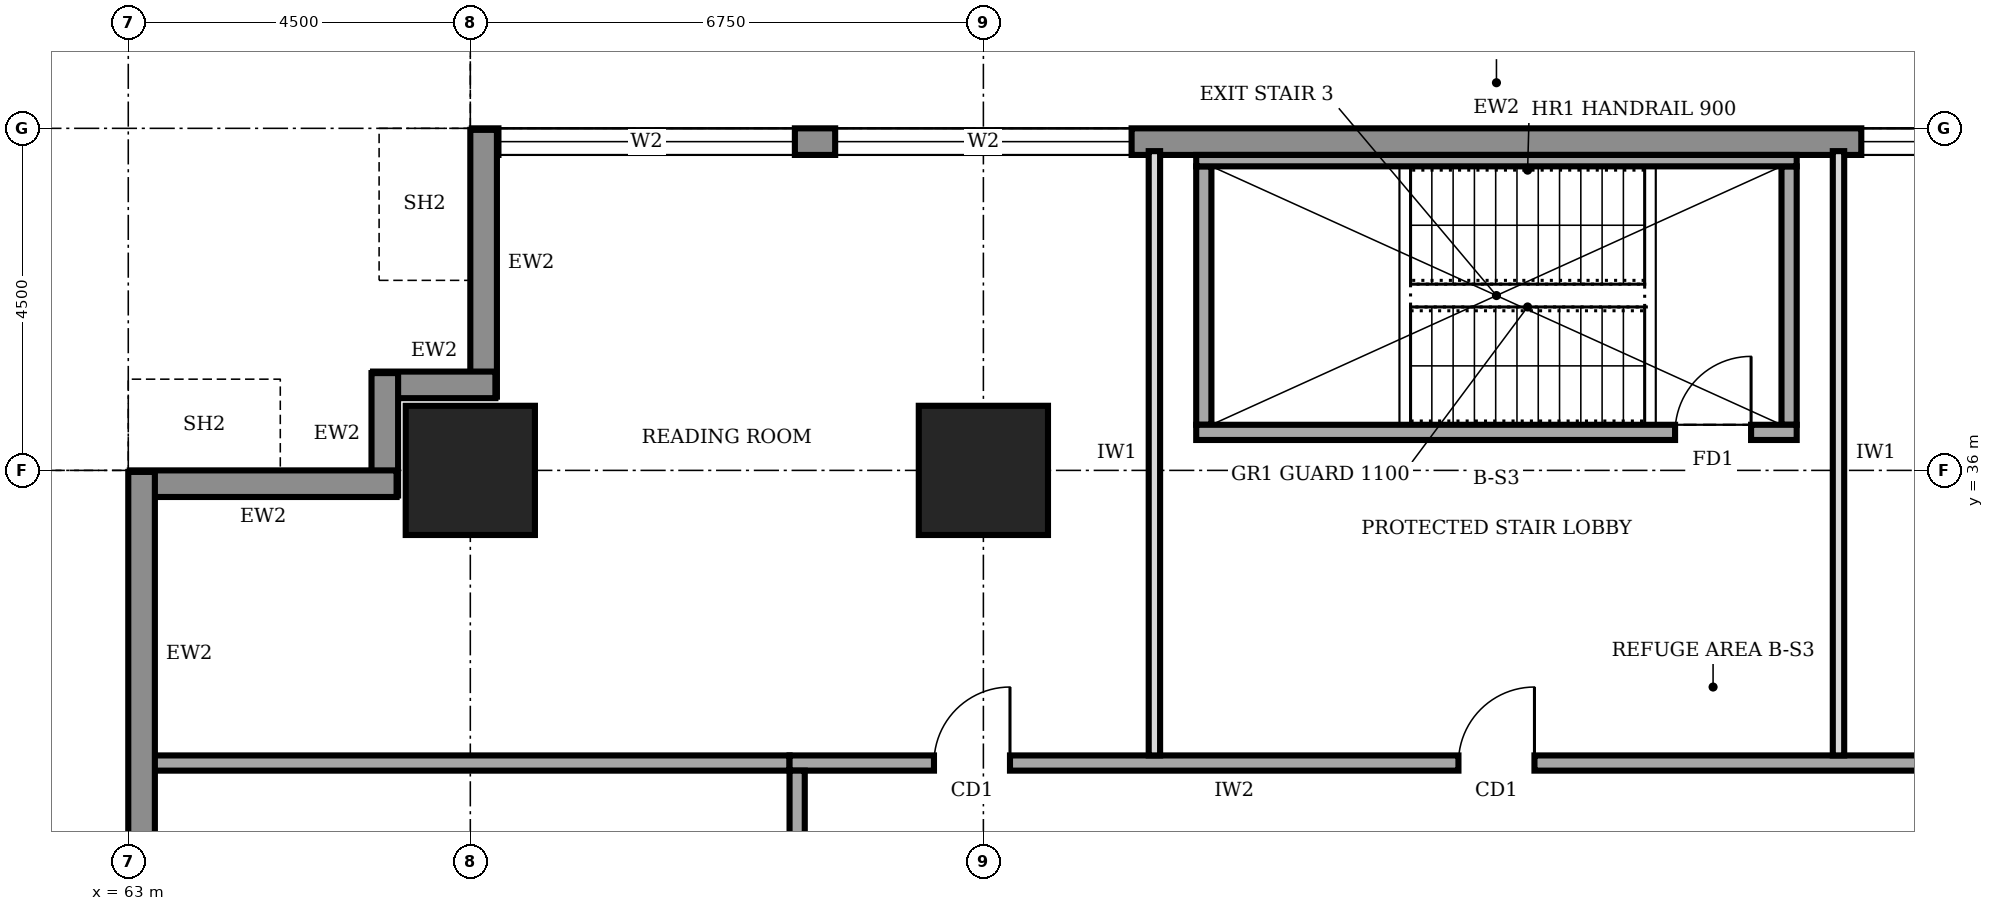
"""IFC4 building model, lengths in metres.
Left out: names, types, materials, properties, quantities, classifications, styles, units other than length and angle.
Written with IfcOpenShell. Run it as: python <this file> out.ifc"""

import sys

from ifc_helpers import new_model, si_unit, direction, frame, frame_2d, origin, origin_2d, place, context, subcontext, project, spatial, rectangle, extrude, element, fill, save


model = new_model("IFC4")
c1 = context("Model", 3, precision=1e-05, world=origin(), true_north=direction((0.0, 1.0)))
c2 = subcontext(c1, "Body", "Model", "MODEL_VIEW")
j1 = project(units=[si_unit("LENGTHUNIT", "METRE"), si_unit("PLANEANGLEUNIT", "RADIAN")], contexts=[c1])
p1 = place(None, origin())
s1 = spatial("IfcSite", under=j1, at=p1, CompositionType="ELEMENT")
p2 = place(p1, origin())
s2 = spatial("IfcBuilding", under=s1, at=p2, CompositionType="ELEMENT")
p3 = place(p2, frame((0.0, 0.0, 53.0)))
s3 = spatial("IfcBuildingStorey", under=s2, at=p3, CompositionType="ELEMENT", Elevation=53.0)
for number, where, z_axis, x_axis in (
    (1, (67.5, 36.0, 0.0), (0.0, 0.0, 1.0), (1.0, 0.0, 0.0)),
    (2, (74.25, 36.0, 0.0), (0.0, 0.0, 1.0), (1.0, 0.0, 0.0)),
):
    element("IfcColumn", number, at=place(p3, frame(where, z_axis=z_axis, x_axis=x_axis)), inside=s3, PredefinedType="COLUMN", context=c2, shape_type="SweptSolid", body=[
        extrude(rectangle(XDim=1.7, YDim=1.7, at=origin_2d()), origin(), (0.0, 0.0, 1.0), 4.0),
    ])
p4 = place(p3, frame((94.48, 40.325, 0.0), z_axis=(0.0, 0.0, 1.0), x_axis=(-1.0, 0.0, 0.0)))
e3 = element("IfcWall", 3, at=p4, inside=s3, PredefinedType="STANDARD", context=c2, shape_type="SweptSolid", body=[
    extrude(rectangle(XDim=26.96, YDim=0.35, at=frame_2d((13.48, 0.0))), origin(), (0.0, 0.0, 1.0), 3.75),
])
p5 = place(p4, frame((22.71, 0.0, 0.6)))
e4 = element("IfcOpeningElement", 4, at=p5, cuts=e3, PredefinedType="OPENING", context=c2, shape_type="SweptSolid", body=[
    extrude(rectangle(XDim=3.9, YDim=2.6, at=frame_2d((1.95, 1.3))), frame((0.0, 0.185, 0.0), z_axis=(0.0, -1.0, 0.0), x_axis=(1.0, 0.0, 0.0)), (0.0, 0.0, 1.0), 0.37),
])
p6 = place(p4, frame((18.28, 0.0, 0.6)))
e5 = element("IfcOpeningElement", 5, at=p6, cuts=e3, PredefinedType="OPENING", context=c2, shape_type="SweptSolid", body=[
    extrude(rectangle(XDim=3.9, YDim=2.6, at=frame_2d((1.95, 1.3))), frame((0.0, 0.185, 0.0), z_axis=(0.0, -1.0, 0.0), x_axis=(1.0, 0.0, 0.0)), (0.0, 0.0, 1.0), 0.37),
])
p7 = place(p4, frame((4.78, 0.0, 0.6)))
e6 = element("IfcOpeningElement", 6, at=p7, cuts=e3, PredefinedType="OPENING", context=c2, shape_type="SweptSolid", body=[
    extrude(rectangle(XDim=3.9, YDim=2.6, at=frame_2d((1.95, 1.3))), frame((0.0, 0.185, 0.0), z_axis=(0.0, -1.0, 0.0), x_axis=(1.0, 0.0, 0.0)), (0.0, 0.0, 1.0), 0.37),
])
p8 = place(p3, frame((67.675, 40.48, 0.0), z_axis=(0.0, 0.0, 1.0), x_axis=(0.0, -1.0, 0.0)))
e7 = element("IfcWall", 7, at=p8, inside=s3, PredefinedType="STANDARD", context=c2, shape_type="SweptSolid", body=[
    extrude(rectangle(XDim=3.51, YDim=0.35, at=frame_2d((1.755, 0.0))), origin(), (0.0, 0.0, 1.0), 2.85),
])
for number, where, z_axis, x_axis in (
    (8, (67.83, 37.125, 0.0), (0.0, 0.0, 1.0), (-1.0, 0.0, 0.0)),
    (9, (66.375, 37.28, 0.0), (0.0, 0.0, 1.0), (0.0, -1.0, 0.0)),
):
    element("IfcWall", number, at=place(p3, frame(where, z_axis=z_axis, x_axis=x_axis)), inside=s3, PredefinedType="STANDARD", context=c2, shape_type="SweptSolid", body=[
        extrude(rectangle(XDim=1.61, YDim=0.35, at=frame_2d((0.805, 0.0))), origin(), (0.0, 0.0, 1.0), 3.75),
    ])
p9 = place(p3, frame((66.53, 35.825, 0.0), z_axis=(0.0, 0.0, 1.0), x_axis=(-1.0, 0.0, 0.0)))
e10 = element("IfcWall", 10, at=p9, inside=s3, PredefinedType="STANDARD", context=c2, shape_type="SweptSolid", body=[
    extrude(rectangle(XDim=3.51, YDim=0.35, at=frame_2d((1.755, 0.0))), origin(), (0.0, 0.0, 1.0), 2.85),
])
p10 = place(p3, frame((63.175, 35.98, 0.0), z_axis=(0.0, 0.0, 1.0), x_axis=(0.0, -1.0, 0.0)))
e11 = element("IfcWall", 11, at=p10, inside=s3, PredefinedType="STANDARD", context=c2, shape_type="SweptSolid", body=[
    extrude(rectangle(XDim=31.46, YDim=0.35, at=frame_2d((15.73, 0.0))), origin(), (0.0, 0.0, 1.0), 3.75),
])
p11 = place(p10, frame((27.21, 0.0, 0.6)))
e12 = element("IfcOpeningElement", 12, at=p11, cuts=e11, PredefinedType="OPENING", context=c2, shape_type="SweptSolid", body=[
    extrude(rectangle(XDim=3.9, YDim=2.6, at=frame_2d((1.95, 1.3))), frame((0.0, 0.185, 0.0), z_axis=(0.0, -1.0, 0.0), x_axis=(1.0, 0.0, 0.0)), (0.0, 0.0, 1.0), 0.37),
])
p12 = place(p10, frame((22.78, 0.0, 0.6)))
e13 = element("IfcOpeningElement", 13, at=p12, cuts=e11, PredefinedType="OPENING", context=c2, shape_type="SweptSolid", body=[
    extrude(rectangle(XDim=3.9, YDim=2.6, at=frame_2d((1.95, 1.3))), frame((0.0, 0.185, 0.0), z_axis=(0.0, -1.0, 0.0), x_axis=(1.0, 0.0, 0.0)), (0.0, 0.0, 1.0), 0.37),
])
p13 = place(p10, frame((18.28, 0.0, 0.6)))
e14 = element("IfcOpeningElement", 14, at=p13, cuts=e11, PredefinedType="OPENING", context=c2, shape_type="SweptSolid", body=[
    extrude(rectangle(XDim=3.9, YDim=2.6, at=frame_2d((1.95, 1.3))), frame((0.0, 0.185, 0.0), z_axis=(0.0, -1.0, 0.0), x_axis=(1.0, 0.0, 0.0)), (0.0, 0.0, 1.0), 0.37),
])
p14 = place(p10, frame((13.78, 0.0, 0.6)))
e15 = element("IfcOpeningElement", 15, at=p14, cuts=e11, PredefinedType="OPENING", context=c2, shape_type="SweptSolid", body=[
    extrude(rectangle(XDim=3.9, YDim=2.6, at=frame_2d((1.95, 1.3))), frame((0.0, 0.185, 0.0), z_axis=(0.0, -1.0, 0.0), x_axis=(1.0, 0.0, 0.0)), (0.0, 0.0, 1.0), 0.37),
])
p15 = place(p10, frame((9.28, 0.0, 0.6)))
e16 = element("IfcOpeningElement", 16, at=p15, cuts=e11, PredefinedType="OPENING", context=c2, shape_type="SweptSolid", body=[
    extrude(rectangle(XDim=3.9, YDim=2.6, at=frame_2d((1.95, 1.3))), frame((0.0, 0.185, 0.0), z_axis=(0.0, -1.0, 0.0), x_axis=(1.0, 0.0, 0.0)), (0.0, 0.0, 1.0), 0.37),
])
p16 = place(p10, frame((4.78, 0.0, 0.6)))
e17 = element("IfcOpeningElement", 17, at=p16, cuts=e11, PredefinedType="OPENING", context=c2, shape_type="SweptSolid", body=[
    extrude(rectangle(XDim=3.9, YDim=2.6, at=frame_2d((1.95, 1.3))), frame((0.0, 0.185, 0.0), z_axis=(0.0, -1.0, 0.0), x_axis=(1.0, 0.0, 0.0)), (0.0, 0.0, 1.0), 0.37),
])
p17 = place(p3, frame((89.35, 32.15, 0.0), z_axis=(0.0, 0.0, 1.0), x_axis=(-1.0, 0.0, 0.0)))
e18 = element("IfcWall", 18, at=p17, inside=s3, PredefinedType="SOLIDWALL", context=c2, shape_type="SweptSolid", body=[
    extrude(rectangle(XDim=17.65, YDim=0.2, at=frame_2d((8.825, 0.0))), origin(), (0.0, 0.0, 1.0), 3.75),
])
p18 = place(p17, frame((14.75, 0.0, 0.0)))
e19 = element("IfcOpeningElement", 19, at=p18, cuts=e18, PredefinedType="OPENING", context=c2, shape_type="SweptSolid", body=[
    extrude(rectangle(XDim=1.0, YDim=2.1, at=frame_2d((0.5, 1.05))), frame((0.0, 0.11, 0.0), z_axis=(0.0, -1.0, 0.0), x_axis=(1.0, 0.0, 0.0)), (0.0, 0.0, 1.0), 0.22),
])
p19 = place(p17, frame((7.85, 0.0, 0.0)))
e20 = element("IfcOpeningElement", 20, at=p19, cuts=e18, PredefinedType="OPENING", context=c2, shape_type="SweptSolid", body=[
    extrude(rectangle(XDim=1.0, YDim=2.1, at=frame_2d((0.5, 1.05))), frame((0.0, 0.11, 0.0), z_axis=(0.0, -1.0, 0.0), x_axis=(1.0, 0.0, 0.0)), (0.0, 0.0, 1.0), 0.22),
])
p20 = place(p17, frame((1.325, 0.0, 0.0)))
e21 = element("IfcOpeningElement", 21, at=p20, cuts=e18, PredefinedType="OPENING", context=c2, shape_type="SweptSolid", body=[
    extrude(rectangle(XDim=1.0, YDim=2.1, at=frame_2d((0.5, 1.05))), frame((0.0, 0.11, 0.0), z_axis=(0.0, -1.0, 0.0), x_axis=(1.0, 0.0, 0.0)), (0.0, 0.0, 1.0), 0.22),
])
p21 = place(p3, frame((71.8, 32.05, 0.0), z_axis=(0.0, 0.0, 1.0), x_axis=(0.0, -1.0, 0.0)))
e22 = element("IfcWall", 22, at=p21, inside=s3, PredefinedType="SOLIDWALL", context=c2, shape_type="SweptSolid", body=[
    extrude(rectangle(XDim=23.05, YDim=0.2, at=frame_2d((11.525, 0.0))), origin(), (0.0, 0.0, 1.0), 3.75),
])
p22 = place(p21, frame((18.05, 0.0, 0.0)))
e23 = element("IfcOpeningElement", 23, at=p22, cuts=e22, PredefinedType="OPENING", context=c2, shape_type="SweptSolid", body=[
    extrude(rectangle(XDim=1.0, YDim=2.1, at=frame_2d((0.5, 1.05))), frame((0.0, 0.11, 0.0), z_axis=(0.0, -1.0, 0.0), x_axis=(1.0, 0.0, 0.0)), (0.0, 0.0, 1.0), 0.22),
])
p23 = place(p21, frame((11.3, 0.0, 0.0)))
e24 = element("IfcOpeningElement", 24, at=p23, cuts=e22, PredefinedType="OPENING", context=c2, shape_type="SweptSolid", body=[
    extrude(rectangle(XDim=1.0, YDim=2.1, at=frame_2d((0.5, 1.05))), frame((0.0, 0.11, 0.0), z_axis=(0.0, -1.0, 0.0), x_axis=(1.0, 0.0, 0.0)), (0.0, 0.0, 1.0), 0.22),
])
p24 = place(p21, frame((4.175, 0.0, 0.0)))
e25 = element("IfcOpeningElement", 25, at=p24, cuts=e22, PredefinedType="OPENING", context=c2, shape_type="SweptSolid", body=[
    extrude(rectangle(XDim=1.0, YDim=2.1, at=frame_2d((0.5, 1.05))), frame((0.0, 0.11, 0.0), z_axis=(0.0, -1.0, 0.0), x_axis=(1.0, 0.0, 0.0)), (0.0, 0.0, 1.0), 0.22),
])
p25 = place(p3, frame((63.3, 32.15, 0.0), z_axis=(0.0, 0.0, 1.0), x_axis=(1.0, 0.0, 0.0)))
e26 = element("IfcWall", 26, at=p25, inside=s3, PredefinedType="SOLIDWALL", context=c2, shape_type="SweptSolid", body=[
    extrude(rectangle(XDim=8.4, YDim=0.2, at=frame_2d((4.2, 0.0))), origin(), (0.0, 0.0, 1.0), 3.75),
])
for number, where, z_axis, x_axis in (
    (27, (76.5, 32.25, 0.0), (0.0, 0.0, 1.0), (0.0, 1.0, 0.0)),
    (28, (85.5, 32.25, 0.0), (0.0, 0.0, 1.0), (0.0, 1.0, 0.0)),
):
    element("IfcWall", number, at=place(p3, frame(where, z_axis=z_axis, x_axis=x_axis)), inside=s3, PredefinedType="PARTITIONING", context=c2, shape_type="SweptSolid", body=[
        extrude(rectangle(XDim=7.95, YDim=0.15, at=frame_2d((3.975, 0.0))), origin(), (0.0, 0.0, 1.0), 3.75),
    ])
p26 = place(p3, frame((77.05, 36.5, 0.0), z_axis=(0.0, 0.0, 1.0), x_axis=(1.0, 0.0, 0.0)))
e29 = element("IfcWall", 29, at=p26, inside=s3, PredefinedType="SOLIDWALL", context=c2, shape_type="SweptSolid", body=[
    extrude(rectangle(XDim=7.9, YDim=0.2, at=frame_2d((3.95, 0.0))), origin(), (0.0, 0.0, 1.0), 3.75),
])
p27 = place(p26, frame((6.3, 0.0, 0.0)))
e30 = element("IfcOpeningElement", 30, at=p27, cuts=e29, PredefinedType="OPENING", context=c2, shape_type="SweptSolid", body=[
    extrude(rectangle(XDim=1.0, YDim=2.1, at=frame_2d((0.5, 1.05))), frame((0.0, 0.11, 0.0), z_axis=(0.0, -1.0, 0.0), x_axis=(1.0, 0.0, 0.0)), (0.0, 0.0, 1.0), 0.22),
])
p28 = place(p3, frame((77.05, 40.075, 0.0), z_axis=(0.0, 0.0, 1.0), x_axis=(1.0, 0.0, 0.0)))
e31 = element("IfcWall", 31, at=p28, inside=s3, PredefinedType="SOLIDWALL", context=c2, shape_type="SweptSolid", body=[
    extrude(rectangle(XDim=7.9, YDim=0.15, at=frame_2d((3.95, 0.0))), origin(), (0.0, 0.0, 1.0), 3.75),
])
for number, where, z_axis, x_axis in (
    (32, (77.15, 36.6, 0.0), (0.0, 0.0, 1.0), (0.0, 1.0, 0.0)),
    (33, (84.85, 36.6, 0.0), (0.0, 0.0, 1.0), (0.0, 1.0, 0.0)),
):
    element("IfcWall", number, at=place(p3, frame(where, z_axis=z_axis, x_axis=x_axis)), inside=s3, PredefinedType="SOLIDWALL", context=c2, shape_type="SweptSolid", body=[
        extrude(rectangle(XDim=3.4, YDim=0.2, at=frame_2d((1.7, 0.0))), origin(), (0.0, 0.0, 1.0), 3.75),
    ])
p29 = place(p5, origin())
e34 = element("IfcWindow", 34, at=p29, inside=s3, PartitioningType="SINGLE_PANEL", PredefinedType="WINDOW", context=c2, shape_type="SweptSolid", body=[
    extrude(rectangle(XDim=3.9, YDim=2.6, at=frame_2d((1.95, 1.3))), frame((0.0, 0.03, 0.0), z_axis=(0.0, -1.0, 0.0), x_axis=(1.0, 0.0, 0.0)), (0.0, 0.0, 1.0), 0.06),
])
fill(e4, e34)
p30 = place(p6, origin())
e35 = element("IfcWindow", 35, at=p30, inside=s3, PartitioningType="SINGLE_PANEL", PredefinedType="WINDOW", context=c2, shape_type="SweptSolid", body=[
    extrude(rectangle(XDim=3.9, YDim=2.6, at=frame_2d((1.95, 1.3))), frame((0.0, 0.03, 0.0), z_axis=(0.0, -1.0, 0.0), x_axis=(1.0, 0.0, 0.0)), (0.0, 0.0, 1.0), 0.06),
])
fill(e5, e35)
p31 = place(p7, origin())
e36 = element("IfcWindow", 36, at=p31, inside=s3, PartitioningType="SINGLE_PANEL", PredefinedType="WINDOW", context=c2, shape_type="SweptSolid", body=[
    extrude(rectangle(XDim=3.9, YDim=2.6, at=frame_2d((1.95, 1.3))), frame((0.0, 0.03, 0.0), z_axis=(0.0, -1.0, 0.0), x_axis=(1.0, 0.0, 0.0)), (0.0, 0.0, 1.0), 0.06),
])
fill(e6, e36)
p32 = place(p18, frame((1.0, 0.0, 0.0), z_axis=(0.0, 0.0, 1.0), x_axis=(-1.0, 0.0, 0.0)))
e37 = element("IfcDoor", 37, at=p32, inside=s3, OperationType="SINGLE_SWING_RIGHT", PredefinedType="DOOR", context=c2, shape_type="SweptSolid", body=[
    extrude(rectangle(XDim=1.0, YDim=2.1, at=frame_2d((0.5, 1.05))), frame((0.0, 0.025, 0.0), z_axis=(0.0, -1.0, 0.0), x_axis=(1.0, 0.0, 0.0)), (0.0, 0.0, 1.0), 0.05),
])
fill(e19, e37)
p33 = place(p19, frame((1.0, 0.0, 0.0), z_axis=(0.0, 0.0, 1.0), x_axis=(-1.0, 0.0, 0.0)))
e38 = element("IfcDoor", 38, at=p33, inside=s3, OperationType="SINGLE_SWING_RIGHT", PredefinedType="DOOR", context=c2, shape_type="SweptSolid", body=[
    extrude(rectangle(XDim=1.0, YDim=2.1, at=frame_2d((0.5, 1.05))), frame((0.0, 0.025, 0.0), z_axis=(0.0, -1.0, 0.0), x_axis=(1.0, 0.0, 0.0)), (0.0, 0.0, 1.0), 0.05),
])
fill(e20, e38)
p34 = place(p27, origin())
e39 = element("IfcDoor", 39, at=p34, inside=s3, OperationType="SINGLE_SWING_RIGHT", PredefinedType="DOOR", context=c2, shape_type="SweptSolid", body=[
    extrude(rectangle(XDim=1.0, YDim=2.1, at=frame_2d((0.5, 1.05))), frame((0.0, 0.025, 0.0), z_axis=(0.0, -1.0, 0.0), x_axis=(1.0, 0.0, 0.0)), (0.0, 0.0, 1.0), 0.05),
])
fill(e30, e39)
save(model, sys.argv[1])
